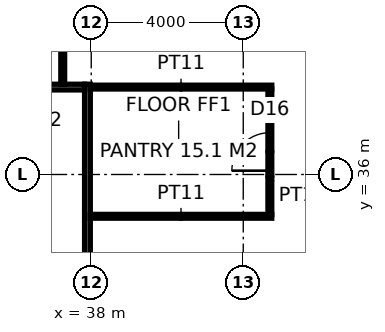
"""IFC4 building model, lengths in metres.
Left out: names, types, materials, properties, quantities, classifications, styles, units other than length and angle.
Written with IfcOpenShell. Run it as: python <this file> out.ifc"""

import sys

from ifc_helpers import new_model, si_unit, direction, frame, frame_2d, origin, place, context, subcontext, project, spatial, rectangle, extrude, element, fill, save


model = new_model("IFC4")
c1 = context("Model", 3, precision=1e-05, world=origin(), true_north=direction((0.0, 1.0)))
c2 = subcontext(c1, "Body", "Model", "MODEL_VIEW")
j1 = project(units=[si_unit("LENGTHUNIT", "METRE"), si_unit("PLANEANGLEUNIT", "RADIAN")], contexts=[c1])
p1 = place(None, origin())
s1 = spatial("IfcSite", under=j1, at=p1, CompositionType="ELEMENT")
p2 = place(p1, origin())
s2 = spatial("IfcBuilding", under=s1, at=p2, CompositionType="ELEMENT")
p3 = place(p2, frame((0.0, 0.0, 101.4)))
s3 = spatial("IfcBuildingStorey", under=s2, at=p3, CompositionType="ELEMENT", Elevation=101.4)
p4 = place(p3, frame((37.9, 15.625, 0.0), z_axis=(0.0, 0.0, 1.0), x_axis=(0.0, 1.0, 0.0)))
e1 = element("IfcWall", 1, at=p4, inside=s3, PredefinedType="PARTITIONING", context=c2, shape_type="SweptSolid", body=[
    extrude(rectangle(XDim=22.75, YDim=0.15, at=frame_2d((11.375, 0.0))), origin(), (0.0, 0.0, 1.0), 2.65),
])
p5 = place(p4, frame((4.974, 0.0, 0.0)))
e2 = element("IfcOpeningElement", 2, at=p5, cuts=e1, PredefinedType="OPENING", context=c2, shape_type="SweptSolid", body=[
    extrude(rectangle(XDim=1.8, YDim=2.4, at=frame_2d((0.9, 1.2))), frame((0.0, 0.085, 0.0), z_axis=(0.0, -1.0, 0.0), x_axis=(1.0, 0.0, 0.0)), (0.0, 0.0, 1.0), 0.17),
])
p6 = place(p4, frame((16.226, 0.0, 0.0)))
e3 = element("IfcOpeningElement", 3, at=p6, cuts=e1, PredefinedType="OPENING", context=c2, shape_type="SweptSolid", body=[
    extrude(rectangle(XDim=1.8, YDim=2.4, at=frame_2d((0.9, 1.2))), frame((0.0, 0.085, 0.0), z_axis=(0.0, -1.0, 0.0), x_axis=(1.0, 0.0, 0.0)), (0.0, 0.0, 1.0), 0.17),
])
p7 = place(p3, frame((15.775, 38.3, 0.0), z_axis=(0.0, 0.0, 1.0), x_axis=(1.0, 0.0, 0.0)))
e4 = element("IfcWall", 4, at=p7, inside=s3, PredefinedType="PARTITIONING", context=c2, shape_type="SweptSolid", body=[
    extrude(rectangle(XDim=22.05, YDim=0.15, at=frame_2d((11.025, 0.0))), origin(), (0.0, 0.0, 1.0), 3.85),
])
p8 = place(p7, frame((7.975, 0.0, 0.0)))
e5 = element("IfcOpeningElement", 5, at=p8, cuts=e4, PredefinedType="OPENING", context=c2, shape_type="SweptSolid", body=[
    extrude(rectangle(XDim=0.9, YDim=2.1, at=frame_2d((0.45, 1.05))), frame((0.0, 0.085, 0.0), z_axis=(0.0, -1.0, 0.0), x_axis=(1.0, 0.0, 0.0)), (0.0, 0.0, 1.0), 0.17),
])
p9 = place(p7, frame((11.725, 0.0, 0.0)))
e6 = element("IfcOpeningElement", 6, at=p9, cuts=e4, PredefinedType="OPENING", context=c2, shape_type="SweptSolid", body=[
    extrude(rectangle(XDim=1.0, YDim=2.1, at=frame_2d((0.5, 1.05))), frame((0.0, 0.085, 0.0), z_axis=(0.0, -1.0, 0.0), x_axis=(1.0, 0.0, 0.0)), (0.0, 0.0, 1.0), 0.17),
])
p10 = place(p7, frame((15.575, 0.0, 0.0)))
e7 = element("IfcOpeningElement", 7, at=p10, cuts=e4, PredefinedType="OPENING", context=c2, shape_type="SweptSolid", body=[
    extrude(rectangle(XDim=0.9, YDim=2.1, at=frame_2d((0.45, 1.05))), frame((0.0, 0.085, 0.0), z_axis=(0.0, -1.0, 0.0), x_axis=(1.0, 0.0, 0.0)), (0.0, 0.0, 1.0), 0.17),
])
for number, where, z_axis, x_axis in (
    (8, (37.975, 34.9, 0.0), (0.0, 0.0, 1.0), (1.0, 0.0, 0.0)),
    (9, (37.975, 38.3, 0.0), (0.0, 0.0, 1.0), (1.0, 0.0, 0.0)),
):
    element("IfcWall", number, at=place(p3, frame(where, z_axis=z_axis, x_axis=x_axis)), inside=s3, PredefinedType="PARTITIONING", context=c2, shape_type="SweptSolid", body=[
        extrude(rectangle(XDim=4.775, YDim=0.1, at=frame_2d((2.387, 0.0))), origin(), (0.0, 0.0, 1.0), 3.85),
    ])
p11 = place(p3, frame((37.25, 38.375, 0.0), z_axis=(0.0, 0.0, 1.0), x_axis=(0.0, 1.0, 0.0)))
e10 = element("IfcWall", 10, at=p11, inside=s3, PredefinedType="PARTITIONING", context=c2, shape_type="SweptSolid", body=[
    extrude(rectangle(XDim=3.475, YDim=0.1, at=frame_2d((1.738, 0.0))), origin(), (0.0, 0.0, 1.0), 3.85),
])
p12 = place(p3, frame((42.7, 34.95, 0.0), z_axis=(0.0, 0.0, 1.0), x_axis=(0.0, 1.0, 0.0)))
e11 = element("IfcWall", 11, at=p12, inside=s3, PredefinedType="PARTITIONING", context=c2, shape_type="SweptSolid", body=[
    extrude(rectangle(XDim=3.3, YDim=0.1, at=frame_2d((1.65, 0.0))), origin(), (0.0, 0.0, 1.0), 3.85),
])
p13 = place(p12, frame((1.15, 0.0, 0.0)))
e12 = element("IfcOpeningElement", 12, at=p13, cuts=e11, PredefinedType="OPENING", context=c2, shape_type="SweptSolid", body=[
    extrude(rectangle(XDim=1.0, YDim=2.2, at=frame_2d((0.5, 1.1))), frame((0.0, 0.06, 0.0), z_axis=(0.0, -1.0, 0.0), x_axis=(1.0, 0.0, 0.0)), (0.0, 0.0, 1.0), 0.12),
])
p14 = place(p13, origin())
e13 = element("IfcDoor", 13, at=p14, inside=s3, OperationType="SINGLE_SWING_LEFT", PredefinedType="DOOR", context=c2, shape_type="SweptSolid", body=[
    extrude(rectangle(XDim=1.0, YDim=2.2, at=frame_2d((0.5, 1.1))), frame((0.0, 0.025, 0.0), z_axis=(0.0, -1.0, 0.0), x_axis=(1.0, 0.0, 0.0)), (0.0, 0.0, 1.0), 0.05),
])
fill(e12, e13)
save(model, sys.argv[1])
